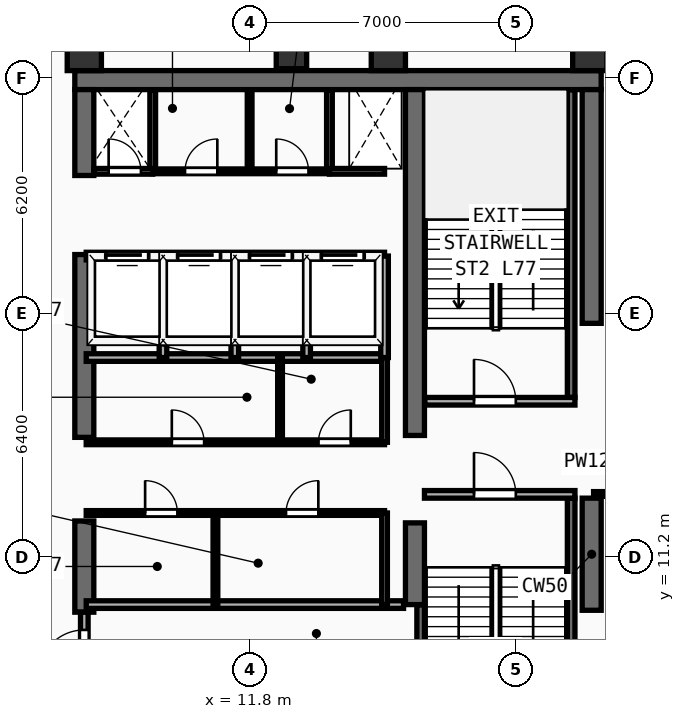
"""IFC4 building model, lengths in metres.
Left out: names, types, materials, properties, quantities, classifications, styles, units other than length and angle.
Written with IfcOpenShell. Run it as: python <this file> out.ifc"""

import sys

from ifc_helpers import new_model, si_unit, direction, frame, frame_2d, origin, origin_2d, place, context, subcontext, project, spatial, rectangle, extrude, element, fill, save


model = new_model("IFC4")
c1 = context("Model", 3, precision=1e-05, world=origin(), true_north=direction((0.0, 1.0)))
c2 = subcontext(c1, "Body", "Model", "MODEL_VIEW")
j1 = project(units=[si_unit("LENGTHUNIT", "METRE"), si_unit("PLANEANGLEUNIT", "RADIAN")], contexts=[c1])
p1 = place(None, origin())
s1 = spatial("IfcSite", under=j1, at=p1, CompositionType="ELEMENT")
p2 = place(p1, origin())
s2 = spatial("IfcBuilding", under=s1, at=p2, CompositionType="ELEMENT")
p3 = place(p2, frame((0.0, 0.0, 300.8)))
s3 = spatial("IfcBuildingStorey", under=s2, at=p3, CompositionType="ELEMENT", Elevation=300.8)
p4 = place(p3, frame((7.2, 23.75, 0.0), z_axis=(0.0, 0.0, 1.0), x_axis=(1.0, 0.0, 0.0)))
e1 = element("IfcWall", 1, at=p4, inside=s3, PredefinedType="SHEAR", context=c2, shape_type="SweptSolid", body=[
    extrude(rectangle(XDim=13.85, YDim=0.5, at=frame_2d((6.925, 0.0))), origin(), (0.0, 0.0, 1.0), 3.56),
])
p5 = place(p3, frame((7.45, 9.75, 0.0), z_axis=(0.0, 0.0, 1.0), x_axis=(0.0, 1.0, 0.0)))
e2 = element("IfcWall", 2, at=p5, inside=s3, PredefinedType="SHEAR", context=c2, shape_type="SweptSolid", body=[
    extrude(rectangle(XDim=2.4, YDim=0.5, at=frame_2d((1.2, 0.0))), origin(), (0.0, 0.0, 1.0), 3.56),
])
p6 = place(p3, frame((7.45, 14.35, 0.0), z_axis=(0.0, 0.0, 1.0), x_axis=(0.0, 1.0, 0.0)))
e3 = element("IfcWall", 3, at=p6, inside=s3, PredefinedType="SHEAR", context=c2, shape_type="SweptSolid", body=[
    extrude(rectangle(XDim=4.81, YDim=0.5, at=frame_2d((2.405, 0.0))), origin(), (0.0, 0.0, 1.0), 3.56),
])
p7 = place(p3, frame((7.45, 21.24, 0.0), z_axis=(0.0, 0.0, 1.0), x_axis=(0.0, 1.0, 0.0)))
e4 = element("IfcWall", 4, at=p7, inside=s3, PredefinedType="SHEAR", context=c2, shape_type="SweptSolid", body=[
    extrude(rectangle(XDim=2.26, YDim=0.5, at=frame_2d((1.13, 0.0))), origin(), (0.0, 0.0, 1.0), 3.56),
])
p8 = place(p3, frame((20.8, 9.8, 0.0), z_axis=(0.0, 0.0, 1.0), x_axis=(0.0, 1.0, 0.0)))
e5 = element("IfcWall", 5, at=p8, inside=s3, PredefinedType="SHEAR", context=c2, shape_type="SweptSolid", body=[
    extrude(rectangle(XDim=2.95, YDim=0.5, at=frame_2d((1.475, 0.0))), origin(), (0.0, 0.0, 1.0), 3.56),
])
p9 = place(p3, frame((20.8, 17.35, 0.0), z_axis=(0.0, 0.0, 1.0), x_axis=(0.0, 1.0, 0.0)))
e6 = element("IfcWall", 6, at=p9, inside=s3, PredefinedType="SHEAR", context=c2, shape_type="SweptSolid", body=[
    extrude(rectangle(XDim=6.15, YDim=0.5, at=frame_2d((3.075, 0.0))), origin(), (0.0, 0.0, 1.0), 3.56),
])
p10 = place(p3, frame((16.15, 9.95, 0.0), z_axis=(0.0, 0.0, 1.0), x_axis=(0.0, 1.0, 0.0)))
e7 = element("IfcWall", 7, at=p10, inside=s3, PredefinedType="SHEAR", context=c2, shape_type="SweptSolid", body=[
    extrude(rectangle(XDim=2.15, YDim=0.5, at=frame_2d((1.075, 0.0))), origin(), (0.0, 0.0, 1.0), 3.56),
])
p11 = place(p3, frame((16.15, 14.4, 0.0), z_axis=(0.0, 0.0, 1.0), x_axis=(0.0, 1.0, 0.0)))
e8 = element("IfcWall", 8, at=p11, inside=s3, PredefinedType="SHEAR", context=c2, shape_type="SweptSolid", body=[
    extrude(rectangle(XDim=9.1, YDim=0.5, at=frame_2d((4.55, 0.0))), origin(), (0.0, 0.0, 1.0), 3.56),
])
for number, where, z_axis, x_axis in (
    (9, (7.45, 24.45, 0.0), (0.0, 0.0, 1.0), (1.0, 0.0, 0.0)),
    (10, (15.45, 24.45, 0.0), (0.0, 0.0, 1.0), (1.0, 0.0, 0.0)),
    (11, (20.75, 24.45, 0.0), (0.0, 0.0, 1.0), (1.0, 0.0, 0.0)),
):
    element("IfcColumn", number, at=place(p3, frame(where, z_axis=z_axis, x_axis=x_axis)), inside=s3, PredefinedType="COLUMN", context=c2, shape_type="SweptSolid", body=[
        extrude(rectangle(XDim=0.9, YDim=0.9, at=origin_2d()), origin(), (0.0, 0.0, 1.0), 3.56),
    ])
p12 = place(p3, frame((12.9, 24.45, 0.0), z_axis=(0.0, 0.0, 1.0), x_axis=(1.0, 0.0, 0.0)))
e12 = element("IfcColumn", 12, at=p12, inside=s3, PredefinedType="COLUMN", context=c2, shape_type="SweptSolid", body=[
    extrude(rectangle(XDim=0.8, YDim=0.8, at=origin_2d()), origin(), (0.0, 0.0, 1.0), 3.56),
])
p13 = place(p3, frame((27.58, 19.67, 0.0), z_axis=(0.0, 0.0, 1.0), x_axis=(-0.707106781187, 0.707106781187, 0.0)))
e13 = element("IfcWall", 13, at=p13, inside=s3, PredefinedType="SOLIDWALL", context=c2, shape_type="SweptSolid", body=[
    extrude(rectangle(XDim=9.207, YDim=0.28, at=frame_2d((4.603, 0.0))), origin(), (0.0, 0.0, 1.0), 3.56),
])
p14 = place(p3, frame((16.3, 7.36, 0.0), z_axis=(0.0, 0.0, 1.0), x_axis=(0.0, 1.0, 0.0)))
e14 = element("IfcWall", 14, at=p14, inside=s3, PredefinedType="SHEAR", context=c2, shape_type="SweptSolid", body=[
    extrude(rectangle(XDim=2.58, YDim=0.2, at=frame_2d((1.29, 0.0))), origin(), (0.0, 0.0, 1.0), 3.56),
])
p15 = place(p3, frame((20.26, 4.66, 0.0), z_axis=(0.0, 0.0, 1.0), x_axis=(0.0, 1.0, 0.0)))
e15 = element("IfcWall", 15, at=p15, inside=s3, PredefinedType="SHEAR", context=c2, shape_type="SweptSolid", body=[
    extrude(rectangle(XDim=8.09, YDim=0.2, at=frame_2d((4.045, 0.0))), origin(), (0.0, 0.0, 1.0), 3.56),
])
p16 = place(p3, frame((16.4, 12.85, 0.0), z_axis=(0.0, 0.0, 1.0), x_axis=(1.0, 0.0, 0.0)))
e16 = element("IfcWall", 16, at=p16, inside=s3, PredefinedType="PARTITIONING", context=c2, shape_type="SweptSolid", body=[
    extrude(rectangle(XDim=3.96, YDim=0.2, at=frame_2d((1.98, 0.0))), origin(), (0.0, 0.0, 1.0), 3.56),
])
p17 = place(p16, frame((1.304, 0.0, 0.0)))
e17 = element("IfcOpeningElement", 17, at=p17, cuts=e16, PredefinedType="OPENING", context=c2, shape_type="SweptSolid", body=[
    extrude(rectangle(XDim=1.1, YDim=2.2, at=frame_2d((0.55, 1.1))), frame((0.0, 0.11, 0.0), z_axis=(0.0, -1.0, 0.0), x_axis=(1.0, 0.0, 0.0)), (0.0, 0.0, 1.0), 0.22),
])
p18 = place(p3, frame((20.26, 15.4, 0.0), z_axis=(0.0, 0.0, 1.0), x_axis=(0.0, 1.0, 0.0)))
e18 = element("IfcWall", 18, at=p18, inside=s3, PredefinedType="SHEAR", context=c2, shape_type="SweptSolid", body=[
    extrude(rectangle(XDim=8.09, YDim=0.2, at=frame_2d((4.045, 0.0))), origin(), (0.0, 0.0, 1.0), 3.56),
])
p19 = place(p3, frame((16.41, 15.3, 0.0), z_axis=(0.0, 0.0, 1.0), x_axis=(1.0, 0.0, 0.0)))
e19 = element("IfcWall", 19, at=p19, inside=s3, PredefinedType="PARTITIONING", context=c2, shape_type="SweptSolid", body=[
    extrude(rectangle(XDim=3.95, YDim=0.2, at=frame_2d((1.975, 0.0))), origin(), (0.0, 0.0, 1.0), 3.56),
])
p20 = place(p19, frame((1.294, 0.0, 0.0)))
e20 = element("IfcOpeningElement", 20, at=p20, cuts=e19, PredefinedType="OPENING", context=c2, shape_type="SweptSolid", body=[
    extrude(rectangle(XDim=1.1, YDim=2.2, at=frame_2d((0.55, 1.1))), frame((0.0, 0.11, 0.0), z_axis=(0.0, -1.0, 0.0), x_axis=(1.0, 0.0, 0.0)), (0.0, 0.0, 1.0), 0.22),
])
p21 = place(p3, frame((7.5, 9.95, 0.0), z_axis=(0.0, 0.0, 1.0), x_axis=(1.0, 0.0, 0.0)))
e21 = element("IfcWall", 21, at=p21, inside=s3, PredefinedType="PARTITIONING", context=c2, shape_type="SweptSolid", body=[
    extrude(rectangle(XDim=8.35, YDim=0.2, at=frame_2d((4.175, 0.0))), origin(), (0.0, 0.0, 1.0), 3.56),
])
p22 = place(p3, frame((7.45, 7.45, 0.0), z_axis=(0.0, 0.0, 1.0), x_axis=(0.0, 1.0, 0.0)))
e22 = element("IfcWall", 22, at=p22, inside=s3, PredefinedType="PARTITIONING", context=c2, shape_type="SweptSolid", body=[
    extrude(rectangle(XDim=2.3, YDim=0.2, at=frame_2d((1.15, 0.0))), origin(), (0.0, 0.0, 1.0), 2.54),
])
p23 = place(p22, frame((0.633, 0.0, 0.0)))
e23 = element("IfcOpeningElement", 23, at=p23, cuts=e22, PredefinedType="OPENING", context=c2, shape_type="SweptSolid", body=[
    extrude(rectangle(XDim=1.2, YDim=2.25, at=frame_2d((0.6, 1.125))), frame((0.0, 0.11, 0.0), z_axis=(0.0, -1.0, 0.0), x_axis=(1.0, 0.0, 0.0)), (0.0, 0.0, 1.0), 0.22),
])
p24 = place(p3, frame((7.5, 16.45, 0.0), z_axis=(0.0, 0.0, 1.0), x_axis=(1.0, 0.0, 0.0)))
e24 = element("IfcWall", 24, at=p24, inside=s3, PredefinedType="PARTITIONING", context=c2, shape_type="SweptSolid", body=[
    extrude(rectangle(XDim=7.85, YDim=0.2, at=frame_2d((3.925, 0.0))), origin(), (0.0, 0.0, 1.0), 3.56),
])
p25 = place(p3, frame((7.5, 12.36, 0.0), z_axis=(0.0, 0.0, 1.0), x_axis=(1.0, 0.0, 0.0)))
e25 = element("IfcWall", 25, at=p25, inside=s3, PredefinedType="PARTITIONING", context=c2, shape_type="SweptSolid", body=[
    extrude(rectangle(XDim=7.85, YDim=0.125, at=frame_2d((3.925, 0.0))), origin(), (0.0, 0.0, 1.0), 3.56),
])
p26 = place(p25, frame((1.55, 0.0, 0.0)))
e26 = element("IfcOpeningElement", 26, at=p26, cuts=e25, PredefinedType="OPENING", context=c2, shape_type="SweptSolid", body=[
    extrude(rectangle(XDim=0.85, YDim=2.15, at=frame_2d((0.425, 1.075))), frame((0.0, 0.073, 0.0), z_axis=(0.0, -1.0, 0.0), x_axis=(1.0, 0.0, 0.0)), (0.0, 0.0, 1.0), 0.145),
])
p27 = place(p25, frame((5.258, 0.0, 0.0)))
e27 = element("IfcOpeningElement", 27, at=p27, cuts=e25, PredefinedType="OPENING", context=c2, shape_type="SweptSolid", body=[
    extrude(rectangle(XDim=0.85, YDim=2.15, at=frame_2d((0.425, 1.075))), frame((0.0, 0.073, 0.0), z_axis=(0.0, -1.0, 0.0), x_axis=(1.0, 0.0, 0.0)), (0.0, 0.0, 1.0), 0.145),
])
p28 = place(p3, frame((7.5, 14.22, 0.0), z_axis=(0.0, 0.0, 1.0), x_axis=(1.0, 0.0, 0.0)))
e28 = element("IfcWall", 28, at=p28, inside=s3, PredefinedType="PARTITIONING", context=c2, shape_type="SweptSolid", body=[
    extrude(rectangle(XDim=7.85, YDim=0.125, at=frame_2d((3.925, 0.0))), origin(), (0.0, 0.0, 1.0), 3.56),
])
p29 = place(p28, frame((2.252, 0.0, 0.0)))
e29 = element("IfcOpeningElement", 29, at=p29, cuts=e28, PredefinedType="OPENING", context=c2, shape_type="SweptSolid", body=[
    extrude(rectangle(XDim=0.85, YDim=2.15, at=frame_2d((0.425, 1.075))), frame((0.0, 0.073, 0.0), z_axis=(0.0, -1.0, 0.0), x_axis=(1.0, 0.0, 0.0)), (0.0, 0.0, 1.0), 0.145),
])
p30 = place(p28, frame((6.111, 0.0, 0.0)))
e30 = element("IfcOpeningElement", 30, at=p30, cuts=e28, PredefinedType="OPENING", context=c2, shape_type="SweptSolid", body=[
    extrude(rectangle(XDim=0.85, YDim=2.15, at=frame_2d((0.425, 1.075))), frame((0.0, 0.073, 0.0), z_axis=(0.0, -1.0, 0.0), x_axis=(1.0, 0.0, 0.0)), (0.0, 0.0, 1.0), 0.145),
])
p31 = place(p3, frame((15.35, 9.95, 0.0), z_axis=(0.0, 0.0, 1.0), x_axis=(0.0, 1.0, 0.0)))
e31 = element("IfcWall", 31, at=p31, inside=s3, PredefinedType="PARTITIONING", context=c2, shape_type="SweptSolid", body=[
    extrude(rectangle(XDim=2.41, YDim=0.15, at=frame_2d((1.205, 0.0))), origin(), (0.0, 0.0, 1.0), 3.56),
])
p32 = place(p3, frame((15.35, 14.22, 0.0), z_axis=(0.0, 0.0, 1.0), x_axis=(0.0, 1.0, 0.0)))
e32 = element("IfcWall", 32, at=p32, inside=s3, PredefinedType="PARTITIONING", context=c2, shape_type="SweptSolid", body=[
    extrude(rectangle(XDim=2.23, YDim=0.15, at=frame_2d((1.115, 0.0))), origin(), (0.0, 0.0, 1.0), 3.56),
])
p33 = place(p3, frame((10.9, 9.95, 0.0), z_axis=(0.0, 0.0, 1.0), x_axis=(0.0, 1.0, 0.0)))
e33 = element("IfcWall", 33, at=p33, inside=s3, PredefinedType="PARTITIONING", context=c2, shape_type="SweptSolid", body=[
    extrude(rectangle(XDim=2.41, YDim=0.125, at=frame_2d((1.205, 0.0))), origin(), (0.0, 0.0, 1.0), 3.56),
])
p34 = place(p3, frame((12.6, 14.22, 0.0), z_axis=(0.0, 0.0, 1.0), x_axis=(0.0, 1.0, 0.0)))
e34 = element("IfcWall", 34, at=p34, inside=s3, PredefinedType="PARTITIONING", context=c2, shape_type="SweptSolid", body=[
    extrude(rectangle(XDim=2.23, YDim=0.125, at=frame_2d((1.115, 0.0))), origin(), (0.0, 0.0, 1.0), 3.56),
])
p35 = place(p3, frame((7.5, 19.12, 0.0), z_axis=(0.0, 0.0, 1.0), x_axis=(1.0, 0.0, 0.0)))
e35 = element("IfcWall", 35, at=p35, inside=s3, PredefinedType="PARTITIONING", context=c2, shape_type="SweptSolid", body=[
    extrude(rectangle(XDim=7.85, YDim=0.2, at=frame_2d((3.925, 0.0))), origin(), (0.0, 0.0, 1.0), 3.56),
])
p36 = place(p35, frame((0.53, 0.0, 0.0)))
e36 = element("IfcOpeningElement", 36, at=p36, cuts=e35, PredefinedType="OPENING", context=c2, shape_type="SweptSolid", body=[
    extrude(rectangle(XDim=1.1, YDim=2.2, at=frame_2d((0.55, 1.1))), frame((0.0, 0.11, 0.0), z_axis=(0.0, -1.0, 0.0), x_axis=(1.0, 0.0, 0.0)), (0.0, 0.0, 1.0), 0.22),
])
p37 = place(p35, frame((2.42, 0.0, 0.0)))
e37 = element("IfcOpeningElement", 37, at=p37, cuts=e35, PredefinedType="OPENING", context=c2, shape_type="SweptSolid", body=[
    extrude(rectangle(XDim=1.1, YDim=2.2, at=frame_2d((0.55, 1.1))), frame((0.0, 0.11, 0.0), z_axis=(0.0, -1.0, 0.0), x_axis=(1.0, 0.0, 0.0)), (0.0, 0.0, 1.0), 0.22),
])
p38 = place(p35, frame((4.31, 0.0, 0.0)))
e38 = element("IfcOpeningElement", 38, at=p38, cuts=e35, PredefinedType="OPENING", context=c2, shape_type="SweptSolid", body=[
    extrude(rectangle(XDim=1.1, YDim=2.2, at=frame_2d((0.55, 1.1))), frame((0.0, 0.11, 0.0), z_axis=(0.0, -1.0, 0.0), x_axis=(1.0, 0.0, 0.0)), (0.0, 0.0, 1.0), 0.22),
])
p39 = place(p35, frame((6.2, 0.0, 0.0)))
e39 = element("IfcOpeningElement", 39, at=p39, cuts=e35, PredefinedType="OPENING", context=c2, shape_type="SweptSolid", body=[
    extrude(rectangle(XDim=1.1, YDim=2.2, at=frame_2d((0.55, 1.1))), frame((0.0, 0.11, 0.0), z_axis=(0.0, -1.0, 0.0), x_axis=(1.0, 0.0, 0.0)), (0.0, 0.0, 1.0), 0.22),
])
for number, where, z_axis, x_axis in (
    (40, (15.35, 16.45, 0.0), (0.0, 0.0, 1.0), (0.0, 1.0, 0.0)),
    (41, (9.52, 16.45, 0.0), (0.0, 0.0, 1.0), (0.0, 1.0, 0.0)),
    (42, (11.41, 16.45, 0.0), (0.0, 0.0, 1.0), (0.0, 1.0, 0.0)),
    (43, (13.3, 16.45, 0.0), (0.0, 0.0, 1.0), (0.0, 1.0, 0.0)),
):
    element("IfcWall", number, at=place(p3, frame(where, z_axis=z_axis, x_axis=x_axis)), inside=s3, PredefinedType="PARTITIONING", context=c2, shape_type="SweptSolid", body=[
        extrude(rectangle(XDim=2.67, YDim=0.2, at=frame_2d((1.335, 0.0))), origin(), (0.0, 0.0, 1.0), 3.56),
    ])
for number, where, z_axis, x_axis in (
    (44, (9.25, 21.35, 0.0), (0.0, 0.0, 1.0), (0.0, 1.0, 0.0)),
    (45, (13.9, 21.35, 0.0), (0.0, 0.0, 1.0), (0.0, 1.0, 0.0)),
):
    element("IfcWall", number, at=place(p3, frame(where, z_axis=z_axis, x_axis=x_axis)), inside=s3, PredefinedType="PARTITIONING", context=c2, shape_type="SweptSolid", body=[
        extrude(rectangle(XDim=2.13, YDim=0.15, at=frame_2d((1.065, 0.0))), origin(), (0.0, 0.0, 1.0), 3.56),
    ])
p40 = place(p3, frame((7.7, 21.35, 0.0), z_axis=(0.0, 0.0, 1.0), x_axis=(1.0, 0.0, 0.0)))
e46 = element("IfcWall", 46, at=p40, inside=s3, PredefinedType="PARTITIONING", context=c2, shape_type="SweptSolid", body=[
    extrude(rectangle(XDim=1.55, YDim=0.15, at=frame_2d((0.775, 0.0))), origin(), (0.0, 0.0, 1.0), 3.56),
])
p41 = place(p40, frame((0.39, 0.0, 0.0)))
e47 = element("IfcOpeningElement", 47, at=p41, cuts=e46, PredefinedType="OPENING", context=c2, shape_type="SweptSolid", body=[
    extrude(rectangle(XDim=0.85, YDim=2.15, at=frame_2d((0.425, 1.075))), frame((0.0, 0.085, 0.0), z_axis=(0.0, -1.0, 0.0), x_axis=(1.0, 0.0, 0.0)), (0.0, 0.0, 1.0), 0.17),
])
p42 = place(p3, frame((13.9, 21.35, 0.0), z_axis=(0.0, 0.0, 1.0), x_axis=(1.0, 0.0, 0.0)))
e48 = element("IfcWall", 48, at=p42, inside=s3, PredefinedType="PARTITIONING", context=c2, shape_type="SweptSolid", body=[
    extrude(rectangle(XDim=1.45, YDim=0.15, at=frame_2d((0.725, 0.0))), origin(), (0.0, 0.0, 1.0), 3.56),
])
p43 = place(p3, frame((9.25, 21.35, 0.0), z_axis=(0.0, 0.0, 1.0), x_axis=(1.0, 0.0, 0.0)))
e49 = element("IfcWall", 49, at=p43, inside=s3, PredefinedType="PARTITIONING", context=c2, shape_type="SweptSolid", body=[
    extrude(rectangle(XDim=4.65, YDim=0.125, at=frame_2d((2.325, 0.0))), origin(), (0.0, 0.0, 1.0), 3.56),
])
p44 = place(p43, frame((0.85, 0.0, 0.0)))
e50 = element("IfcOpeningElement", 50, at=p44, cuts=e49, PredefinedType="OPENING", context=c2, shape_type="SweptSolid", body=[
    extrude(rectangle(XDim=0.85, YDim=2.15, at=frame_2d((0.425, 1.075))), frame((0.0, 0.073, 0.0), z_axis=(0.0, -1.0, 0.0), x_axis=(1.0, 0.0, 0.0)), (0.0, 0.0, 1.0), 0.145),
])
p45 = place(p43, frame((3.25, 0.0, 0.0)))
e51 = element("IfcOpeningElement", 51, at=p45, cuts=e49, PredefinedType="OPENING", context=c2, shape_type="SweptSolid", body=[
    extrude(rectangle(XDim=0.85, YDim=2.15, at=frame_2d((0.425, 1.075))), frame((0.0, 0.073, 0.0), z_axis=(0.0, -1.0, 0.0), x_axis=(1.0, 0.0, 0.0)), (0.0, 0.0, 1.0), 0.145),
])
p46 = place(p3, frame((11.8, 21.35, 0.0), z_axis=(0.0, 0.0, 1.0), x_axis=(0.0, 1.0, 0.0)))
e52 = element("IfcWall", 52, at=p46, inside=s3, PredefinedType="PARTITIONING", context=c2, shape_type="SweptSolid", body=[
    extrude(rectangle(XDim=2.13, YDim=0.125, at=frame_2d((1.065, 0.0))), origin(), (0.0, 0.0, 1.0), 3.56),
])
p47 = place(p3, frame((20.85, 12.86, 0.0), z_axis=(0.0, 0.0, 1.0), x_axis=(1.0, 0.0, 0.0)))
e53 = element("IfcWall", 53, at=p47, inside=s3, PredefinedType="PARTITIONING", context=c2, shape_type="SweptSolid", body=[
    extrude(rectangle(XDim=2.85, YDim=0.125, at=frame_2d((1.425, 0.0))), origin(), (0.0, 0.0, 1.0), 3.56),
])
p48 = place(p47, frame((0.971, 0.0, 0.0)))
e54 = element("IfcOpeningElement", 54, at=p48, cuts=e53, PredefinedType="OPENING", context=c2, shape_type="SweptSolid", body=[
    extrude(rectangle(XDim=0.95, YDim=2.15, at=frame_2d((0.475, 1.075))), frame((0.0, 0.073, 0.0), z_axis=(0.0, -1.0, 0.0), x_axis=(1.0, 0.0, 0.0)), (0.0, 0.0, 1.0), 0.145),
])
p49 = place(p17, frame((1.1, 0.0, 0.0), z_axis=(0.0, 0.0, 1.0), x_axis=(-1.0, 0.0, 0.0)))
e55 = element("IfcDoor", 55, at=p49, inside=s3, OperationType="SINGLE_SWING_RIGHT", PredefinedType="DOOR", context=c2, shape_type="SweptSolid", body=[
    extrude(rectangle(XDim=1.1, YDim=2.2, at=frame_2d((0.55, 1.1))), frame((0.0, 0.025, 0.0), z_axis=(0.0, -1.0, 0.0), x_axis=(1.0, 0.0, 0.0)), (0.0, 0.0, 1.0), 0.05),
])
fill(e17, e55)
p50 = place(p20, origin())
e56 = element("IfcDoor", 56, at=p50, inside=s3, OperationType="SINGLE_SWING_LEFT", PredefinedType="DOOR", context=c2, shape_type="SweptSolid", body=[
    extrude(rectangle(XDim=1.1, YDim=2.2, at=frame_2d((0.55, 1.1))), frame((0.0, 0.025, 0.0), z_axis=(0.0, -1.0, 0.0), x_axis=(1.0, 0.0, 0.0)), (0.0, 0.0, 1.0), 0.05),
])
fill(e20, e56)
p51 = place(p23, frame((1.2, 0.0, 0.0), z_axis=(0.0, 0.0, 1.0), x_axis=(-1.0, 0.0, 0.0)))
e57 = element("IfcDoor", 57, at=p51, inside=s3, OperationType="SINGLE_SWING_RIGHT", PredefinedType="DOOR", context=c2, shape_type="SweptSolid", body=[
    extrude(rectangle(XDim=1.2, YDim=2.25, at=frame_2d((0.6, 1.125))), frame((0.0, 0.025, 0.0), z_axis=(0.0, -1.0, 0.0), x_axis=(1.0, 0.0, 0.0)), (0.0, 0.0, 1.0), 0.05),
])
fill(e23, e57)
p52 = place(p26, origin())
e58 = element("IfcDoor", 58, at=p52, inside=s3, OperationType="SINGLE_SWING_LEFT", PredefinedType="DOOR", context=c2, shape_type="SweptSolid", body=[
    extrude(rectangle(XDim=0.85, YDim=2.15, at=frame_2d((0.425, 1.075))), frame((0.0, 0.025, 0.0), z_axis=(0.0, -1.0, 0.0), x_axis=(1.0, 0.0, 0.0)), (0.0, 0.0, 1.0), 0.05),
])
fill(e26, e58)
p53 = place(p27, origin())
e59 = element("IfcDoor", 59, at=p53, inside=s3, OperationType="SINGLE_SWING_RIGHT", PredefinedType="DOOR", context=c2, shape_type="SweptSolid", body=[
    extrude(rectangle(XDim=0.85, YDim=2.15, at=frame_2d((0.425, 1.075))), frame((0.0, 0.025, 0.0), z_axis=(0.0, -1.0, 0.0), x_axis=(1.0, 0.0, 0.0)), (0.0, 0.0, 1.0), 0.05),
])
fill(e27, e59)
p54 = place(p29, origin())
e60 = element("IfcDoor", 60, at=p54, inside=s3, OperationType="SINGLE_SWING_LEFT", PredefinedType="DOOR", context=c2, shape_type="SweptSolid", body=[
    extrude(rectangle(XDim=0.85, YDim=2.15, at=frame_2d((0.425, 1.075))), frame((0.0, 0.025, 0.0), z_axis=(0.0, -1.0, 0.0), x_axis=(1.0, 0.0, 0.0)), (0.0, 0.0, 1.0), 0.05),
])
fill(e29, e60)
p55 = place(p30, origin())
e61 = element("IfcDoor", 61, at=p55, inside=s3, OperationType="SINGLE_SWING_RIGHT", PredefinedType="DOOR", context=c2, shape_type="SweptSolid", body=[
    extrude(rectangle(XDim=0.85, YDim=2.15, at=frame_2d((0.425, 1.075))), frame((0.0, 0.025, 0.0), z_axis=(0.0, -1.0, 0.0), x_axis=(1.0, 0.0, 0.0)), (0.0, 0.0, 1.0), 0.05),
])
fill(e30, e61)
p56 = place(p36, origin())
e62 = element("IfcDoor", 62, at=p56, inside=s3, OperationType="SLIDING_TO_LEFT", PredefinedType="DOOR", context=c2, shape_type="SweptSolid", body=[
    extrude(rectangle(XDim=1.1, YDim=2.2, at=frame_2d((0.55, 1.1))), frame((0.0, 0.025, 0.0), z_axis=(0.0, -1.0, 0.0), x_axis=(1.0, 0.0, 0.0)), (0.0, 0.0, 1.0), 0.05),
])
fill(e36, e62)
p57 = place(p37, origin())
e63 = element("IfcDoor", 63, at=p57, inside=s3, OperationType="SLIDING_TO_LEFT", PredefinedType="DOOR", context=c2, shape_type="SweptSolid", body=[
    extrude(rectangle(XDim=1.1, YDim=2.2, at=frame_2d((0.55, 1.1))), frame((0.0, 0.025, 0.0), z_axis=(0.0, -1.0, 0.0), x_axis=(1.0, 0.0, 0.0)), (0.0, 0.0, 1.0), 0.05),
])
fill(e37, e63)
p58 = place(p38, origin())
e64 = element("IfcDoor", 64, at=p58, inside=s3, OperationType="SLIDING_TO_LEFT", PredefinedType="DOOR", context=c2, shape_type="SweptSolid", body=[
    extrude(rectangle(XDim=1.1, YDim=2.2, at=frame_2d((0.55, 1.1))), frame((0.0, 0.025, 0.0), z_axis=(0.0, -1.0, 0.0), x_axis=(1.0, 0.0, 0.0)), (0.0, 0.0, 1.0), 0.05),
])
fill(e38, e64)
p59 = place(p39, origin())
e65 = element("IfcDoor", 65, at=p59, inside=s3, OperationType="SLIDING_TO_LEFT", PredefinedType="DOOR", context=c2, shape_type="SweptSolid", body=[
    extrude(rectangle(XDim=1.1, YDim=2.2, at=frame_2d((0.55, 1.1))), frame((0.0, 0.025, 0.0), z_axis=(0.0, -1.0, 0.0), x_axis=(1.0, 0.0, 0.0)), (0.0, 0.0, 1.0), 0.05),
])
fill(e39, e65)
p60 = place(p41, origin())
e66 = element("IfcDoor", 66, at=p60, inside=s3, OperationType="SINGLE_SWING_LEFT", PredefinedType="DOOR", context=c2, shape_type="SweptSolid", body=[
    extrude(rectangle(XDim=0.85, YDim=2.15, at=frame_2d((0.425, 1.075))), frame((0.0, 0.025, 0.0), z_axis=(0.0, -1.0, 0.0), x_axis=(1.0, 0.0, 0.0)), (0.0, 0.0, 1.0), 0.05),
])
fill(e47, e66)
p61 = place(p44, origin())
e67 = element("IfcDoor", 67, at=p61, inside=s3, OperationType="SINGLE_SWING_RIGHT", PredefinedType="DOOR", context=c2, shape_type="SweptSolid", body=[
    extrude(rectangle(XDim=0.85, YDim=2.15, at=frame_2d((0.425, 1.075))), frame((0.0, 0.025, 0.0), z_axis=(0.0, -1.0, 0.0), x_axis=(1.0, 0.0, 0.0)), (0.0, 0.0, 1.0), 0.05),
])
fill(e50, e67)
p62 = place(p45, origin())
e68 = element("IfcDoor", 68, at=p62, inside=s3, OperationType="SINGLE_SWING_LEFT", PredefinedType="DOOR", context=c2, shape_type="SweptSolid", body=[
    extrude(rectangle(XDim=0.85, YDim=2.15, at=frame_2d((0.425, 1.075))), frame((0.0, 0.025, 0.0), z_axis=(0.0, -1.0, 0.0), x_axis=(1.0, 0.0, 0.0)), (0.0, 0.0, 1.0), 0.05),
])
fill(e51, e68)
save(model, sys.argv[1])
